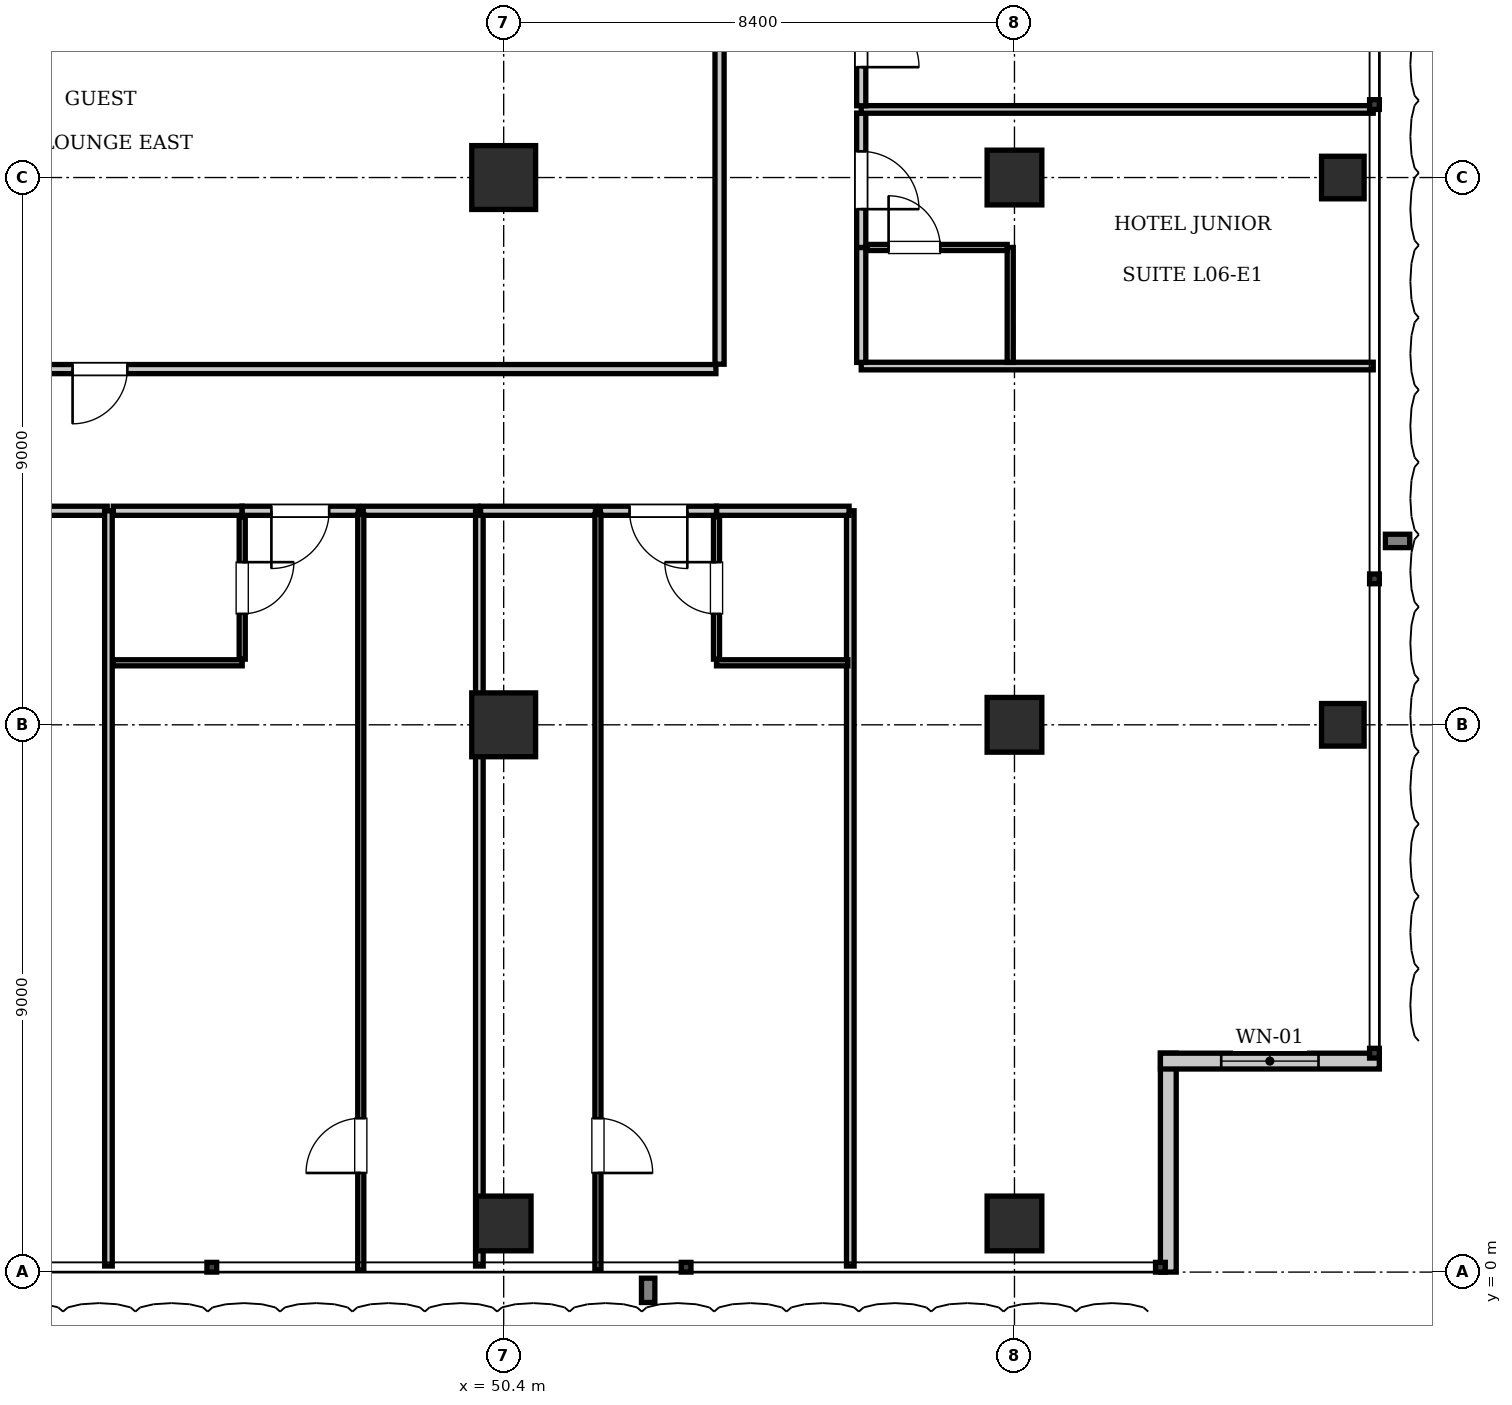
"""IFC4 building model, lengths in metres.
Left out: names, types, materials, properties, quantities, classifications, styles, units other than length and angle.
Written with IfcOpenShell. Run it as: python <this file> out.ifc"""

import sys

from ifc_helpers import new_model, si_unit, direction, frame, frame_2d, origin, origin_2d, place, context, subcontext, project, spatial, rectangle, i_section, extrude, element, fill, save


model = new_model("IFC4")
c1 = context("Model", 3, precision=1e-05, world=origin(), true_north=direction((0.0, 1.0)))
c2 = subcontext(c1, "Body", "Model", "MODEL_VIEW")
j1 = project(units=[si_unit("LENGTHUNIT", "METRE"), si_unit("PLANEANGLEUNIT", "RADIAN")], contexts=[c1])
p1 = place(None, origin())
s1 = spatial("IfcSite", under=j1, at=p1, CompositionType="ELEMENT")
p2 = place(p1, origin())
s2 = spatial("IfcBuilding", under=s1, at=p2, CompositionType="ELEMENT")
p3 = place(p2, frame((0.0, 0.0, 30.8)))
s3 = spatial("IfcBuildingStorey", under=s2, at=p3, CompositionType="ELEMENT", Elevation=30.8)
for number, where, z_axis, x_axis in (
    (1, (50.4, 18.0, 0.0), (0.0, 0.0, 1.0), (1.0, 0.0, 0.0)),
    (2, (50.4, 9.0, 0.0), (0.0, 0.0, 1.0), (1.0, 0.0, 0.0)),
):
    element("IfcColumn", number, at=place(p3, frame(where, z_axis=z_axis, x_axis=x_axis)), inside=s3, PredefinedType="COLUMN", context=c2, shape_type="SweptSolid", body=[
        extrude(rectangle(XDim=1.05, YDim=1.05, at=origin_2d()), origin(), (0.0, 0.0, 1.0), 3.85),
    ])
for number, where, z_axis, x_axis in (
    (3, (58.8, 9.0, 0.0), (0.0, 0.0, 1.0), (1.0, 0.0, 0.0)),
    (4, (58.8, 18.0, 0.0), (0.0, 0.0, 1.0), (1.0, 0.0, 0.0)),
    (5, (50.4, 0.8, 0.0), (0.0, 0.0, 1.0), (1.0, 0.0, 0.0)),
    (6, (58.8, 0.8, 0.0), (0.0, 0.0, 1.0), (1.0, 0.0, 0.0)),
):
    element("IfcColumn", number, at=place(p3, frame(where, z_axis=z_axis, x_axis=x_axis)), inside=s3, PredefinedType="COLUMN", context=c2, shape_type="SweptSolid", body=[
        extrude(rectangle(XDim=0.9, YDim=0.9, at=origin_2d()), origin(), (0.0, 0.0, 1.0), 3.85),
    ])
for number, where, z_axis, x_axis in (
    (7, (64.2, 9.0, 0.0), (0.0, 0.0, 1.0), (1.0, 0.0, 0.0)),
    (8, (64.2, 18.0, 0.0), (0.0, 0.0, 1.0), (1.0, 0.0, 0.0)),
):
    element("IfcColumn", number, at=place(p3, frame(where, z_axis=z_axis, x_axis=x_axis)), inside=s3, PredefinedType="COLUMN", context=c2, shape_type="SweptSolid", body=[
        extrude(i_section(OverallWidth=0.7, OverallDepth=0.7, WebThickness=0.028, FlangeThickness=0.044, at=origin_2d()), origin(), (0.0, 0.0, 1.0), 3.85),
    ])
p4 = place(p3, frame((61.33, 3.6, 0.0), z_axis=(0.0, 0.0, 1.0), x_axis=(0.0, -1.0, 0.0)))
e9 = element("IfcWall", 9, at=p4, inside=s3, PredefinedType="SOLIDWALL", context=c2, shape_type="SweptSolid", body=[
    extrude(rectangle(XDim=3.6, YDim=0.26, at=frame_2d((1.8, 0.0))), origin(), (0.0, 0.0, 1.0), 3.61),
])
p5 = place(p3, frame((64.8, 3.47, 0.0), z_axis=(0.0, 0.0, 1.0), x_axis=(-1.0, 0.0, 0.0)))
e10 = element("IfcWall", 10, at=p5, inside=s3, PredefinedType="SOLIDWALL", context=c2, shape_type="SweptSolid", body=[
    extrude(rectangle(XDim=3.6, YDim=0.26, at=frame_2d((1.8, 0.0))), origin(), (0.0, 0.0, 1.0), 3.61),
])
p6 = place(p5, frame((1.0, 0.0, 0.9)))
e11 = element("IfcOpeningElement", 11, at=p6, cuts=e10, PredefinedType="OPENING", context=c2, shape_type="SweptSolid", body=[
    extrude(rectangle(XDim=1.6, YDim=2.1, at=frame_2d((0.8, 1.05))), frame((0.0, 0.14, 0.0), z_axis=(0.0, -1.0, 0.0), x_axis=(1.0, 0.0, 0.0)), (0.0, 0.0, 1.0), 0.28),
])
p7 = place(p3, frame((53.95, 14.93, 0.0), z_axis=(0.0, 0.0, 1.0), x_axis=(0.0, 1.0, 0.0)))
e12 = element("IfcWall", 12, at=p7, inside=s3, PredefinedType="PARTITIONING", context=c2, shape_type="SweptSolid", body=[
    extrude(rectangle(XDim=8.23, YDim=0.15, at=frame_2d((4.115, 0.0))), origin(), (0.0, 0.0, 1.0), 3.61),
])
p8 = place(p3, frame((33.631, 14.85, 0.0), z_axis=(0.0, 0.0, 1.0), x_axis=(1.0, 0.0, 0.0)))
e13 = element("IfcWall", 13, at=p8, inside=s3, PredefinedType="PARTITIONING", context=c2, shape_type="SweptSolid", body=[
    extrude(rectangle(XDim=20.259, YDim=0.15, at=frame_2d((10.129, 0.0))), origin(), (0.0, 0.0, 1.0), 3.61),
])
p9 = place(p8, frame((9.679, 0.0, 0.0)))
e14 = element("IfcOpeningElement", 14, at=p9, cuts=e13, PredefinedType="OPENING", context=c2, shape_type="SweptSolid", body=[
    extrude(rectangle(XDim=0.9, YDim=2.1, at=frame_2d((0.45, 1.05))), frame((0.0, 0.085, 0.0), z_axis=(0.0, -1.0, 0.0), x_axis=(1.0, 0.0, 0.0)), (0.0, 0.0, 1.0), 0.17),
])
p10 = place(p3, frame((56.1, 0.1, 0.0), z_axis=(0.0, 0.0, 1.0), x_axis=(0.0, 1.0, 0.0)))
e15 = element("IfcWall", 15, at=p10, inside=s3, PredefinedType="PARTITIONING", context=c2, shape_type="SweptSolid", body=[
    extrude(rectangle(XDim=12.42, YDim=0.125, at=frame_2d((6.21, 0.0))), origin(), (0.0, 0.0, 1.0), 3.61),
])
p11 = place(p3, frame((41.99, 12.52, 0.0), z_axis=(0.0, 0.0, 1.0), x_axis=(1.0, 0.0, 0.0)))
e16 = element("IfcWall", 16, at=p11, inside=s3, PredefinedType="PARTITIONING", context=c2, shape_type="SweptSolid", body=[
    extrude(rectangle(XDim=1.89, YDim=0.15, at=frame_2d((0.945, 0.0))), origin(), (0.0, 0.0, 1.0), 3.61),
])
p12 = place(p3, frame((43.9, 0.1, 0.0), z_axis=(0.0, 0.0, 1.0), x_axis=(0.0, 1.0, 0.0)))
e17 = element("IfcWall", 17, at=p12, inside=s3, PredefinedType="PARTITIONING", context=c2, shape_type="SweptSolid", body=[
    extrude(rectangle(XDim=12.42, YDim=0.125, at=frame_2d((6.21, 0.0))), origin(), (0.0, 0.0, 1.0), 3.61),
])
p13 = place(p3, frame((43.98, 12.52, 0.0), z_axis=(0.0, 0.0, 1.0), x_axis=(1.0, 0.0, 0.0)))
e18 = element("IfcWall", 18, at=p13, inside=s3, PredefinedType="PARTITIONING", context=c2, shape_type="SweptSolid", body=[
    extrude(rectangle(XDim=2.12, YDim=0.15, at=frame_2d((1.06, 0.0))), origin(), (0.0, 0.0, 1.0), 3.61),
])
p14 = place(p3, frame((43.98, 10.02, 0.0), z_axis=(0.0, 0.0, 1.0), x_axis=(1.0, 0.0, 0.0)))
e19 = element("IfcWall", 19, at=p14, inside=s3, PredefinedType="PARTITIONING", context=c2, shape_type="SweptSolid", body=[
    extrude(rectangle(XDim=2.12, YDim=0.1, at=frame_2d((1.06, 0.0))), origin(), (0.0, 0.0, 1.0), 3.61),
])
p15 = place(p3, frame((46.1, 10.08, 0.0), z_axis=(0.0, 0.0, 1.0), x_axis=(0.0, 1.0, 0.0)))
e20 = element("IfcWall", 20, at=p15, inside=s3, PredefinedType="PARTITIONING", context=c2, shape_type="SweptSolid", body=[
    extrude(rectangle(XDim=2.34, YDim=0.1, at=frame_2d((1.17, 0.0))), origin(), (0.0, 0.0, 1.0), 3.255),
])
p16 = place(p15, frame((0.745, 0.0, 0.0)))
e21 = element("IfcOpeningElement", 21, at=p16, cuts=e20, PredefinedType="OPENING", context=c2, shape_type="SweptSolid", body=[
    extrude(rectangle(XDim=0.85, YDim=2.1, at=frame_2d((0.425, 1.05))), frame((0.0, 0.06, 0.0), z_axis=(0.0, -1.0, 0.0), x_axis=(1.0, 0.0, 0.0)), (0.0, 0.0, 1.0), 0.12),
])
p17 = place(p3, frame((46.1, 12.52, 0.0), z_axis=(0.0, 0.0, 1.0), x_axis=(1.0, 0.0, 0.0)))
e22 = element("IfcWall", 22, at=p17, inside=s3, PredefinedType="PARTITIONING", context=c2, shape_type="SweptSolid", body=[
    extrude(rectangle(XDim=1.91, YDim=0.15, at=frame_2d((0.955, 0.0))), origin(), (0.0, 0.0, 1.0), 3.61),
])
p18 = place(p17, frame((0.48, 0.0, 0.0)))
e23 = element("IfcOpeningElement", 23, at=p18, cuts=e22, PredefinedType="OPENING", context=c2, shape_type="SweptSolid", body=[
    extrude(rectangle(XDim=0.95, YDim=2.15, at=frame_2d((0.475, 1.075))), frame((0.0, 0.085, 0.0), z_axis=(0.0, -1.0, 0.0), x_axis=(1.0, 0.0, 0.0)), (0.0, 0.0, 1.0), 0.17),
])
p19 = place(p3, frame((48.09, 12.52, 0.0), z_axis=(0.0, 0.0, 1.0), x_axis=(1.0, 0.0, 0.0)))
e24 = element("IfcWall", 24, at=p19, inside=s3, PredefinedType="PARTITIONING", context=c2, shape_type="SweptSolid", body=[
    extrude(rectangle(XDim=1.89, YDim=0.15, at=frame_2d((0.945, 0.0))), origin(), (0.0, 0.0, 1.0), 3.61),
])
p20 = place(p3, frame((48.05, 0.03, 0.0), z_axis=(0.0, 0.0, 1.0), x_axis=(0.0, 1.0, 0.0)))
e25 = element("IfcWall", 25, at=p20, inside=s3, PredefinedType="PARTITIONING", context=c2, shape_type="SweptSolid", body=[
    extrude(rectangle(XDim=12.43, YDim=0.1, at=frame_2d((6.215, 0.0))), origin(), (0.0, 0.0, 1.0), 3.61),
])
p21 = place(p20, frame((1.6, 0.0, 0.0)))
e26 = element("IfcOpeningElement", 26, at=p21, cuts=e25, PredefinedType="OPENING", context=c2, shape_type="SweptSolid", body=[
    extrude(rectangle(XDim=0.9, YDim=2.1, at=frame_2d((0.45, 1.05))), frame((0.0, 0.06, 0.0), z_axis=(0.0, -1.0, 0.0), x_axis=(1.0, 0.0, 0.0)), (0.0, 0.0, 1.0), 0.12),
])
p22 = place(p3, frame((50.0, 0.1, 0.0), z_axis=(0.0, 0.0, 1.0), x_axis=(0.0, 1.0, 0.0)))
e27 = element("IfcWall", 27, at=p22, inside=s3, PredefinedType="PARTITIONING", context=c2, shape_type="SweptSolid", body=[
    extrude(rectangle(XDim=12.42, YDim=0.125, at=frame_2d((6.21, 0.0))), origin(), (0.0, 0.0, 1.0), 3.61),
])
p23 = place(p3, frame((53.9, 12.52, 0.0), z_axis=(0.0, 0.0, 1.0), x_axis=(1.0, 0.0, 0.0)))
e28 = element("IfcWall", 28, at=p23, inside=s3, PredefinedType="PARTITIONING", context=c2, shape_type="SweptSolid", body=[
    extrude(rectangle(XDim=2.18, YDim=0.15, at=frame_2d((1.09, 0.0))), origin(), (0.0, 0.0, 1.0), 3.61),
])
p24 = place(p3, frame((53.9, 10.02, 0.0), z_axis=(0.0, 0.0, 1.0), x_axis=(1.0, 0.0, 0.0)))
e29 = element("IfcWall", 29, at=p24, inside=s3, PredefinedType="PARTITIONING", context=c2, shape_type="SweptSolid", body=[
    extrude(rectangle(XDim=2.16, YDim=0.1, at=frame_2d((1.08, 0.0))), origin(), (0.0, 0.0, 1.0), 3.61),
])
p25 = place(p3, frame((53.9, 10.08, 0.0), z_axis=(0.0, 0.0, 1.0), x_axis=(0.0, 1.0, 0.0)))
e30 = element("IfcWall", 30, at=p25, inside=s3, PredefinedType="PARTITIONING", context=c2, shape_type="SweptSolid", body=[
    extrude(rectangle(XDim=2.34, YDim=0.1, at=frame_2d((1.17, 0.0))), origin(), (0.0, 0.0, 1.0), 3.61),
])
p26 = place(p25, frame((0.745, 0.0, 0.0)))
e31 = element("IfcOpeningElement", 31, at=p26, cuts=e30, PredefinedType="OPENING", context=c2, shape_type="SweptSolid", body=[
    extrude(rectangle(XDim=0.85, YDim=2.1, at=frame_2d((0.425, 1.05))), frame((0.0, 0.06, 0.0), z_axis=(0.0, -1.0, 0.0), x_axis=(1.0, 0.0, 0.0)), (0.0, 0.0, 1.0), 0.12),
])
p27 = place(p3, frame((50.02, 12.52, 0.0), z_axis=(0.0, 0.0, 1.0), x_axis=(1.0, 0.0, 0.0)))
e32 = element("IfcWall", 32, at=p27, inside=s3, PredefinedType="PARTITIONING", context=c2, shape_type="SweptSolid", body=[
    extrude(rectangle(XDim=1.89, YDim=0.15, at=frame_2d((0.945, 0.0))), origin(), (0.0, 0.0, 1.0), 3.61),
])
p28 = place(p3, frame((51.99, 12.52, 0.0), z_axis=(0.0, 0.0, 1.0), x_axis=(1.0, 0.0, 0.0)))
e33 = element("IfcWall", 33, at=p28, inside=s3, PredefinedType="PARTITIONING", context=c2, shape_type="SweptSolid", body=[
    extrude(rectangle(XDim=1.91, YDim=0.15, at=frame_2d((0.955, 0.0))), origin(), (0.0, 0.0, 1.0), 3.61),
])
p29 = place(p28, frame((0.48, 0.0, 0.0)))
e34 = element("IfcOpeningElement", 34, at=p29, cuts=e33, PredefinedType="OPENING", context=c2, shape_type="SweptSolid", body=[
    extrude(rectangle(XDim=0.95, YDim=2.15, at=frame_2d((0.475, 1.075))), frame((0.0, 0.085, 0.0), z_axis=(0.0, -1.0, 0.0), x_axis=(1.0, 0.0, 0.0)), (0.0, 0.0, 1.0), 0.17),
])
p30 = place(p3, frame((51.95, 0.03, 0.0), z_axis=(0.0, 0.0, 1.0), x_axis=(0.0, 1.0, 0.0)))
e35 = element("IfcWall", 35, at=p30, inside=s3, PredefinedType="PARTITIONING", context=c2, shape_type="SweptSolid", body=[
    extrude(rectangle(XDim=12.43, YDim=0.1, at=frame_2d((6.215, 0.0))), origin(), (0.0, 0.0, 1.0), 3.61),
])
p31 = place(p30, frame((1.6, 0.0, 0.0)))
e36 = element("IfcOpeningElement", 36, at=p31, cuts=e35, PredefinedType="OPENING", context=c2, shape_type="SweptSolid", body=[
    extrude(rectangle(XDim=0.9, YDim=2.1, at=frame_2d((0.45, 1.05))), frame((0.0, 0.06, 0.0), z_axis=(0.0, -1.0, 0.0), x_axis=(1.0, 0.0, 0.0)), (0.0, 0.0, 1.0), 0.12),
])
p32 = place(p3, frame((56.28, 14.9, 0.0), z_axis=(0.0, 0.0, 1.0), x_axis=(1.0, 0.0, 0.0)))
e37 = element("IfcWall", 37, at=p32, inside=s3, PredefinedType="PARTITIONING", context=c2, shape_type="SweptSolid", body=[
    extrude(rectangle(XDim=8.42, YDim=0.125, at=frame_2d((4.21, 0.0))), origin(), (0.0, 0.0, 1.0), 3.61),
])
p33 = place(p3, frame((56.28, 14.96, 0.0), z_axis=(0.0, 0.0, 1.0), x_axis=(0.0, 1.0, 0.0)))
e38 = element("IfcWall", 38, at=p33, inside=s3, PredefinedType="PARTITIONING", context=c2, shape_type="SweptSolid", body=[
    extrude(rectangle(XDim=1.89, YDim=0.15, at=frame_2d((0.945, 0.0))), origin(), (0.0, 0.0, 1.0), 3.61),
])
p34 = place(p3, frame((56.28, 16.85, 0.0), z_axis=(0.0, 0.0, 1.0), x_axis=(0.0, 1.0, 0.0)))
e39 = element("IfcWall", 39, at=p34, inside=s3, PredefinedType="PARTITIONING", context=c2, shape_type="SweptSolid", body=[
    extrude(rectangle(XDim=2.21, YDim=0.15, at=frame_2d((1.105, 0.0))), origin(), (0.0, 0.0, 1.0), 3.61),
])
p35 = place(p34, frame((0.63, 0.0, 0.0)))
e40 = element("IfcOpeningElement", 40, at=p35, cuts=e39, PredefinedType="OPENING", context=c2, shape_type="SweptSolid", body=[
    extrude(rectangle(XDim=0.95, YDim=2.15, at=frame_2d((0.475, 1.075))), frame((0.0, 0.085, 0.0), z_axis=(0.0, -1.0, 0.0), x_axis=(1.0, 0.0, 0.0)), (0.0, 0.0, 1.0), 0.17),
])
p36 = place(p3, frame((58.73, 14.96, 0.0), z_axis=(0.0, 0.0, 1.0), x_axis=(0.0, 1.0, 0.0)))
e41 = element("IfcWall", 41, at=p36, inside=s3, PredefinedType="PARTITIONING", context=c2, shape_type="SweptSolid", body=[
    extrude(rectangle(XDim=1.89, YDim=0.1, at=frame_2d((0.945, 0.0))), origin(), (0.0, 0.0, 1.0), 2.975),
])
p37 = place(p3, frame((56.38, 16.85, 0.0), z_axis=(0.0, 0.0, 1.0), x_axis=(1.0, 0.0, 0.0)))
e42 = element("IfcWall", 42, at=p37, inside=s3, PredefinedType="PARTITIONING", context=c2, shape_type="SweptSolid", body=[
    extrude(rectangle(XDim=2.3, YDim=0.1, at=frame_2d((1.15, 0.0))), origin(), (0.0, 0.0, 1.0), 3.61),
])
p38 = place(p37, frame((0.35, 0.0, 0.0)))
e43 = element("IfcOpeningElement", 43, at=p38, cuts=e42, PredefinedType="OPENING", context=c2, shape_type="SweptSolid", body=[
    extrude(rectangle(XDim=0.85, YDim=2.1, at=frame_2d((0.425, 1.05))), frame((0.0, 0.06, 0.0), z_axis=(0.0, -1.0, 0.0), x_axis=(1.0, 0.0, 0.0)), (0.0, 0.0, 1.0), 0.12),
])
p39 = place(p3, frame((56.28, 19.12, 0.0), z_axis=(0.0, 0.0, 1.0), x_axis=(1.0, 0.0, 0.0)))
e44 = element("IfcWall", 44, at=p39, inside=s3, PredefinedType="PARTITIONING", context=c2, shape_type="SweptSolid", body=[
    extrude(rectangle(XDim=8.42, YDim=0.125, at=frame_2d((4.21, 0.0))), origin(), (0.0, 0.0, 1.0), 3.61),
])
p40 = place(p3, frame((56.28, 19.18, 0.0), z_axis=(0.0, 0.0, 1.0), x_axis=(0.0, 1.0, 0.0)))
e45 = element("IfcWall", 45, at=p40, inside=s3, PredefinedType="PARTITIONING", context=c2, shape_type="SweptSolid", body=[
    extrude(rectangle(XDim=2.22, YDim=0.15, at=frame_2d((1.11, 0.0))), origin(), (0.0, 0.0, 1.0), 3.61),
])
p41 = place(p40, frame((0.635, 0.0, 0.0)))
e46 = element("IfcOpeningElement", 46, at=p41, cuts=e45, PredefinedType="OPENING", context=c2, shape_type="SweptSolid", body=[
    extrude(rectangle(XDim=0.95, YDim=2.15, at=frame_2d((0.475, 1.075))), frame((0.0, 0.085, 0.0), z_axis=(0.0, -1.0, 0.0), x_axis=(1.0, 0.0, 0.0)), (0.0, 0.0, 1.0), 0.17),
])
p42 = place(p6, origin())
e47 = element("IfcWindow", 47, at=p42, inside=s3, PartitioningType="SINGLE_PANEL", PredefinedType="WINDOW", context=c2, shape_type="SweptSolid", body=[
    extrude(rectangle(XDim=1.6, YDim=2.1, at=frame_2d((0.8, 1.05))), frame((0.0, 0.03, 0.0), z_axis=(0.0, -1.0, 0.0), x_axis=(1.0, 0.0, 0.0)), (0.0, 0.0, 1.0), 0.06),
])
fill(e11, e47)
p43 = place(p9, frame((0.9, 0.0, 0.0), z_axis=(0.0, 0.0, 1.0), x_axis=(-1.0, 0.0, 0.0)))
e48 = element("IfcDoor", 48, at=p43, inside=s3, OperationType="SINGLE_SWING_RIGHT", PredefinedType="DOOR", context=c2, shape_type="SweptSolid", body=[
    extrude(rectangle(XDim=0.9, YDim=2.1, at=frame_2d((0.45, 1.05))), frame((0.0, 0.025, 0.0), z_axis=(0.0, -1.0, 0.0), x_axis=(1.0, 0.0, 0.0)), (0.0, 0.0, 1.0), 0.05),
])
fill(e14, e48)
p44 = place(p16, frame((0.85, 0.0, 0.0), z_axis=(0.0, 0.0, 1.0), x_axis=(-1.0, 0.0, 0.0)))
e49 = element("IfcDoor", 49, at=p44, inside=s3, OperationType="SINGLE_SWING_LEFT", PredefinedType="DOOR", context=c2, shape_type="SweptSolid", body=[
    extrude(rectangle(XDim=0.85, YDim=2.1, at=frame_2d((0.425, 1.05))), frame((0.0, 0.025, 0.0), z_axis=(0.0, -1.0, 0.0), x_axis=(1.0, 0.0, 0.0)), (0.0, 0.0, 1.0), 0.05),
])
fill(e21, e49)
p45 = place(p18, frame((0.95, 0.0, 0.0), z_axis=(0.0, 0.0, 1.0), x_axis=(-1.0, 0.0, 0.0)))
e50 = element("IfcDoor", 50, at=p45, inside=s3, OperationType="SINGLE_SWING_RIGHT", PredefinedType="DOOR", context=c2, shape_type="SweptSolid", body=[
    extrude(rectangle(XDim=0.95, YDim=2.15, at=frame_2d((0.475, 1.075))), frame((0.0, 0.025, 0.0), z_axis=(0.0, -1.0, 0.0), x_axis=(1.0, 0.0, 0.0)), (0.0, 0.0, 1.0), 0.05),
])
fill(e23, e50)
p46 = place(p21, origin())
e51 = element("IfcDoor", 51, at=p46, inside=s3, OperationType="SINGLE_SWING_LEFT", PredefinedType="DOOR", context=c2, shape_type="SweptSolid", body=[
    extrude(rectangle(XDim=0.9, YDim=2.1, at=frame_2d((0.45, 1.05))), frame((0.0, 0.025, 0.0), z_axis=(0.0, -1.0, 0.0), x_axis=(1.0, 0.0, 0.0)), (0.0, 0.0, 1.0), 0.05),
])
fill(e26, e51)
p47 = place(p26, origin())
e52 = element("IfcDoor", 52, at=p47, inside=s3, OperationType="SINGLE_SWING_RIGHT", PredefinedType="DOOR", context=c2, shape_type="SweptSolid", body=[
    extrude(rectangle(XDim=0.85, YDim=2.1, at=frame_2d((0.425, 1.05))), frame((0.0, 0.025, 0.0), z_axis=(0.0, -1.0, 0.0), x_axis=(1.0, 0.0, 0.0)), (0.0, 0.0, 1.0), 0.05),
])
fill(e31, e52)
p48 = place(p29, frame((0.95, 0.0, 0.0), z_axis=(0.0, 0.0, 1.0), x_axis=(-1.0, 0.0, 0.0)))
e53 = element("IfcDoor", 53, at=p48, inside=s3, OperationType="SINGLE_SWING_LEFT", PredefinedType="DOOR", context=c2, shape_type="SweptSolid", body=[
    extrude(rectangle(XDim=0.95, YDim=2.15, at=frame_2d((0.475, 1.075))), frame((0.0, 0.025, 0.0), z_axis=(0.0, -1.0, 0.0), x_axis=(1.0, 0.0, 0.0)), (0.0, 0.0, 1.0), 0.05),
])
fill(e34, e53)
p49 = place(p31, frame((0.9, 0.0, 0.0), z_axis=(0.0, 0.0, 1.0), x_axis=(-1.0, 0.0, 0.0)))
e54 = element("IfcDoor", 54, at=p49, inside=s3, OperationType="SINGLE_SWING_RIGHT", PredefinedType="DOOR", context=c2, shape_type="SweptSolid", body=[
    extrude(rectangle(XDim=0.9, YDim=2.1, at=frame_2d((0.45, 1.05))), frame((0.0, 0.025, 0.0), z_axis=(0.0, -1.0, 0.0), x_axis=(1.0, 0.0, 0.0)), (0.0, 0.0, 1.0), 0.05),
])
fill(e36, e54)
p50 = place(p38, origin())
e55 = element("IfcDoor", 55, at=p50, inside=s3, OperationType="SINGLE_SWING_LEFT", PredefinedType="DOOR", context=c2, shape_type="SweptSolid", body=[
    extrude(rectangle(XDim=0.85, YDim=2.1, at=frame_2d((0.425, 1.05))), frame((0.0, 0.025, 0.0), z_axis=(0.0, -1.0, 0.0), x_axis=(1.0, 0.0, 0.0)), (0.0, 0.0, 1.0), 0.05),
])
fill(e43, e55)
p51 = place(p35, frame((0.95, 0.0, 0.0), z_axis=(0.0, 0.0, 1.0), x_axis=(-1.0, 0.0, 0.0)))
e56 = element("IfcDoor", 56, at=p51, inside=s3, OperationType="SINGLE_SWING_RIGHT", PredefinedType="DOOR", context=c2, shape_type="SweptSolid", body=[
    extrude(rectangle(XDim=0.95, YDim=2.15, at=frame_2d((0.475, 1.075))), frame((0.0, 0.025, 0.0), z_axis=(0.0, -1.0, 0.0), x_axis=(1.0, 0.0, 0.0)), (0.0, 0.0, 1.0), 0.05),
])
fill(e40, e56)
p52 = place(p41, frame((0.95, 0.0, 0.0), z_axis=(0.0, 0.0, 1.0), x_axis=(-1.0, 0.0, 0.0)))
e57 = element("IfcDoor", 57, at=p52, inside=s3, OperationType="SINGLE_SWING_RIGHT", PredefinedType="DOOR", context=c2, shape_type="SweptSolid", body=[
    extrude(rectangle(XDim=0.95, YDim=2.15, at=frame_2d((0.475, 1.075))), frame((0.0, 0.025, 0.0), z_axis=(0.0, -1.0, 0.0), x_axis=(1.0, 0.0, 0.0)), (0.0, 0.0, 1.0), 0.05),
])
fill(e46, e57)
save(model, sys.argv[1])
